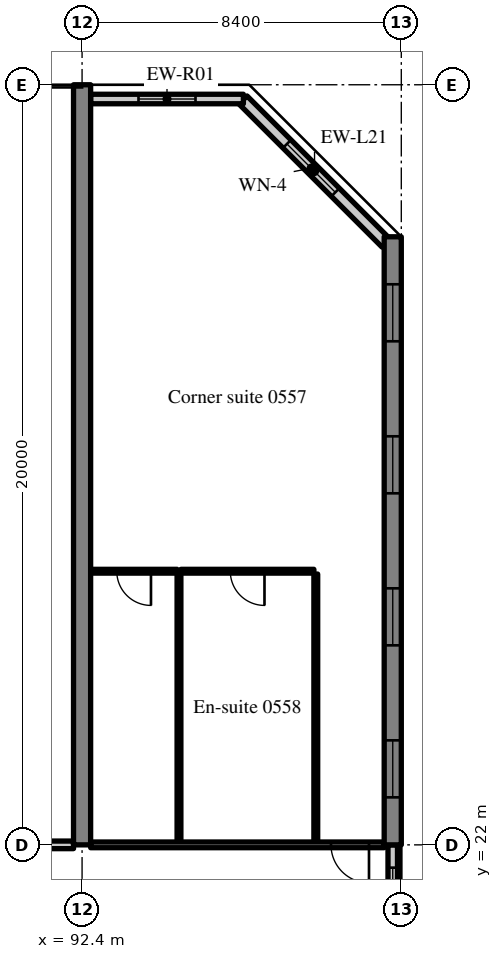
"""IFC4 building model, lengths in metres.
Left out: names, types, materials, properties, quantities, classifications, styles, units other than length and angle.
Written with IfcOpenShell. Run it as: python <this file> out.ifc"""

import sys

from ifc_helpers import new_model, si_unit, direction, frame, frame_2d, origin, place, context, subcontext, project, spatial, rectangle, extrude, source, transform, mapped, element, fill, save


model = new_model("IFC4")
c1 = context("Model", 3, precision=1e-05, world=origin(), true_north=direction((0.0, 1.0)))
c2 = subcontext(c1, "Body", "Model", "MODEL_VIEW")
j1 = project(units=[si_unit("LENGTHUNIT", "METRE"), si_unit("PLANEANGLEUNIT", "RADIAN")], contexts=[c1])
p1 = place(None, origin())
s1 = spatial("IfcSite", under=j1, at=p1, CompositionType="ELEMENT")
p2 = place(p1, origin())
s2 = spatial("IfcBuilding", under=s1, at=p2, CompositionType="ELEMENT")
p3 = place(p2, frame((0.0, 0.0, 27.8)))
s3 = spatial("IfcBuildingStorey", under=s2, at=p3, CompositionType="ELEMENT", Elevation=27.8)
m1 = source(origin(), c2, "Body", "SweptSolid", [
    extrude(rectangle(XDim=20.0, YDim=0.45, at=frame_2d((10.0, 0.0))), origin(), (0.0, 0.0, 1.0), 3.52),
])
p4 = place(p3, frame((92.4, 22.0, 0.0), z_axis=(0.0, 0.0, 1.0), x_axis=(0.0, 1.0, 0.0)))
e1 = element("IfcWall", 1, at=p4, inside=s3, PredefinedType="SHEAR", context=c2, shape_type="MappedRepresentation", body=[
    mapped(m1, transform((0.0, 0.0, 0.0), scale=1.0)),
])
m2 = source(origin(), c2, "Body", "SweptSolid", [
    extrude(rectangle(XDim=16.0, YDim=0.45, at=frame_2d((8.0, 0.0))), origin(), (0.0, 0.0, 1.0), 3.52),
])
p5 = place(p3, frame((100.575, 22.0, 0.0), z_axis=(0.0, 0.0, 1.0), x_axis=(0.0, 1.0, 0.0)))
e2 = element("IfcWall", 2, at=p5, inside=s3, PredefinedType="SHEAR", context=c2, shape_type="MappedRepresentation", body=[
    mapped(m2, transform((0.0, 0.0, 0.0), scale=1.0)),
])
m3 = source(origin(), c2, "Body", "SweptSolid", [
    extrude(rectangle(XDim=1.5, YDim=1.5, at=frame_2d((0.75, 0.75))), frame((0.0, 0.235, 0.0), z_axis=(0.0, -1.0, 0.0), x_axis=(1.0, 0.0, 0.0)), (0.0, 0.0, 1.0), 0.47),
])
p6 = place(p5, frame((1.25, 0.0, 0.9)))
e3 = element("IfcOpeningElement", 3, at=p6, cuts=e2, PredefinedType="OPENING", context=c2, shape_type="MappedRepresentation", body=[
    mapped(m3, transform((0.0, 0.0, 0.0), scale=1.0)),
])
p7 = place(p5, frame((5.25, 0.0, 0.9)))
e4 = element("IfcOpeningElement", 4, at=p7, cuts=e2, PredefinedType="OPENING", context=c2, shape_type="MappedRepresentation", body=[
    mapped(m3, transform((0.0, 0.0, 0.0), scale=1.0)),
])
p8 = place(p5, frame((9.25, 0.0, 0.9)))
e5 = element("IfcOpeningElement", 5, at=p8, cuts=e2, PredefinedType="OPENING", context=c2, shape_type="MappedRepresentation", body=[
    mapped(m3, transform((0.0, 0.0, 0.0), scale=1.0)),
])
p9 = place(p5, frame((13.25, 0.0, 0.9)))
e6 = element("IfcOpeningElement", 6, at=p9, cuts=e2, PredefinedType="OPENING", context=c2, shape_type="MappedRepresentation", body=[
    mapped(m3, transform((0.0, 0.0, 0.0), scale=1.0)),
])
m4 = source(origin(), c2, "Body", "SweptSolid", [
    extrude(rectangle(XDim=5.326, YDim=0.3, at=frame_2d((2.663, 0.0))), origin(), (0.0, 0.0, 1.0), 3.52),
])
p10 = place(p3, frame((100.4, 37.834, 0.0), z_axis=(0.0, 0.0, 1.0), x_axis=(-0.707083859269, 0.707129702361, 0.0)))
e7 = element("IfcWall", 7, at=p10, inside=s3, PredefinedType="SOLIDWALL", context=c2, shape_type="MappedRepresentation", body=[
    mapped(m4, transform((0.0, 0.0, 0.0), scale=1.0)),
])
m5 = source(origin(), c2, "Body", "SweptSolid", [
    extrude(rectangle(XDim=1.8, YDim=1.5, at=frame_2d((0.9, 0.75))), frame((0.0, 0.16, 0.0), z_axis=(0.0, -1.0, 0.0), x_axis=(1.0, 0.0, 0.0)), (0.0, 0.0, 1.0), 0.32),
])
p11 = place(p10, frame((1.889, 0.0, 0.9)))
e8 = element("IfcOpeningElement", 8, at=p11, cuts=e7, PredefinedType="OPENING", context=c2, shape_type="MappedRepresentation", body=[
    mapped(m5, transform((0.0, 0.0, 0.0), scale=1.0)),
])
m6 = source(origin(), c2, "Body", "SweptSolid", [
    extrude(rectangle(XDim=4.02, YDim=0.25, at=frame_2d((2.01, 0.0))), origin(), (0.0, 0.0, 1.0), 2.77),
])
p12 = place(p3, frame((96.645, 41.625, 0.0), z_axis=(0.0, 0.0, 1.0), x_axis=(-1.0, 0.0, 0.0)))
e9 = element("IfcWall", 9, at=p12, inside=s3, PredefinedType="SOLIDWALL", context=c2, shape_type="MappedRepresentation", body=[
    mapped(m6, transform((0.0, 0.0, 0.0), scale=1.0)),
])
m7 = source(origin(), c2, "Body", "SweptSolid", [
    extrude(rectangle(XDim=1.5, YDim=1.5, at=frame_2d((0.75, 0.75))), frame((0.0, 0.135, 0.0), z_axis=(0.0, -1.0, 0.0), x_axis=(1.0, 0.0, 0.0)), (0.0, 0.0, 1.0), 0.27),
])
p13 = place(p12, frame((1.26, 0.0, 0.9)))
e10 = element("IfcOpeningElement", 10, at=p13, cuts=e9, PredefinedType="OPENING", context=c2, shape_type="MappedRepresentation", body=[
    mapped(m7, transform((0.0, 0.0, 0.0), scale=1.0)),
])
m8 = source(origin(), c2, "Body", "SweptSolid", [
    extrude(rectangle(XDim=2.4, YDim=0.25, at=frame_2d((1.2, 0.0))), origin(), (0.0, 0.0, 1.0), 2.62),
])
p14 = place(p3, frame((100.575, 19.6, 0.0), z_axis=(0.0, 0.0, 1.0), x_axis=(0.0, 1.0, 0.0)))
e11 = element("IfcWall", 11, at=p14, inside=s3, PredefinedType="SOLIDWALL", context=c2, shape_type="MappedRepresentation", body=[
    mapped(m8, transform((0.0, 0.0, 0.0), scale=1.0)),
])
m9 = source(origin(), c2, "Body", "SweptSolid", [
    extrude(rectangle(XDim=1.2, YDim=1.5, at=frame_2d((0.6, 0.75))), frame((0.0, 0.135, 0.0), z_axis=(0.0, -1.0, 0.0), x_axis=(1.0, 0.0, 0.0)), (0.0, 0.0, 1.0), 0.27),
])
p15 = place(p14, frame((0.6, 0.0, 0.9)))
e12 = element("IfcOpeningElement", 12, at=p15, cuts=e11, PredefinedType="OPENING", context=c2, shape_type="MappedRepresentation", body=[
    mapped(m9, transform((0.0, 0.0, 0.0), scale=1.0)),
])
m10 = source(origin(), c2, "Body", "SweptSolid", [
    extrude(rectangle(XDim=7.05, YDim=0.1, at=frame_2d((3.525, 0.0))), origin(), (0.0, 0.0, 1.0), 3.52),
])
for number, where, z_axis, x_axis in (
    (13, (98.55, 22.075, 0.0), (0.0, 0.0, 1.0), (0.0, 1.0, 0.0)),
    (14, (94.95, 22.075, 0.0), (0.0, 0.0, 1.0), (0.0, 1.0, 0.0)),
):
    element("IfcWall", number, at=place(p3, frame(where, z_axis=z_axis, x_axis=x_axis)), inside=s3, PredefinedType="PARTITIONING", context=c2, shape_type="MappedRepresentation", body=[
        mapped(m10, transform((0.0, 0.0, 0.0), scale=1.0)),
    ])
m11 = source(origin(), c2, "Body", "SweptSolid", [
    extrude(rectangle(XDim=3.5, YDim=0.1, at=frame_2d((1.75, 0.0))), origin(), (0.0, 0.0, 1.0), 3.52),
])
p16 = place(p3, frame((95.0, 29.2, 0.0), z_axis=(0.0, 0.0, 1.0), x_axis=(1.0, 0.0, 0.0)))
e15 = element("IfcWall", 15, at=p16, inside=s3, PredefinedType="PARTITIONING", context=c2, shape_type="MappedRepresentation", body=[
    mapped(m11, transform((0.0, 0.0, 0.0), scale=1.0)),
])
m12 = source(origin(), c2, "Body", "SweptSolid", [
    extrude(rectangle(XDim=0.9, YDim=2.1, at=frame_2d((0.45, 1.05))), frame((0.0, 0.06, 0.0), z_axis=(0.0, -1.0, 0.0), x_axis=(1.0, 0.0, 0.0)), (0.0, 0.0, 1.0), 0.12),
])
p17 = place(p16, frame((1.3, 0.0, 0.0)))
e16 = element("IfcOpeningElement", 16, at=p17, cuts=e15, PredefinedType="OPENING", context=c2, shape_type="MappedRepresentation", body=[
    mapped(m12, transform((0.0, 0.0, 0.0), scale=1.0)),
])
m13 = source(origin(), c2, "Body", "SweptSolid", [
    extrude(rectangle(XDim=2.275, YDim=0.1, at=frame_2d((1.137, 0.0))), origin(), (0.0, 0.0, 1.0), 3.52),
])
p18 = place(p3, frame((92.625, 29.2, 0.0), z_axis=(0.0, 0.0, 1.0), x_axis=(1.0, 0.0, 0.0)))
e17 = element("IfcWall", 17, at=p18, inside=s3, PredefinedType="PARTITIONING", context=c2, shape_type="MappedRepresentation", body=[
    mapped(m13, transform((0.0, 0.0, 0.0), scale=1.0)),
])
p19 = place(p18, frame((0.688, 0.0, 0.0)))
e18 = element("IfcOpeningElement", 18, at=p19, cuts=e17, PredefinedType="OPENING", context=c2, shape_type="MappedRepresentation", body=[
    mapped(m12, transform((0.0, 0.0, 0.0), scale=1.0)),
])
m14 = source(origin(), c2, "Body", "SweptSolid", [
    extrude(rectangle(XDim=7.725, YDim=0.15, at=frame_2d((3.863, 0.0))), origin(), (0.0, 0.0, 1.0), 2.82),
])
p20 = place(p3, frame((92.625, 22.0, 0.0), z_axis=(0.0, 0.0, 1.0), x_axis=(1.0, 0.0, 0.0)))
e19 = element("IfcWall", 19, at=p20, inside=s3, PredefinedType="PARTITIONING", context=c2, shape_type="MappedRepresentation", body=[
    mapped(m14, transform((0.0, 0.0, 0.0), scale=1.0)),
])
m15 = source(origin(), c2, "Body", "SweptSolid", [
    extrude(rectangle(XDim=1.0, YDim=2.1, at=frame_2d((0.5, 1.05))), frame((0.0, 0.085, 0.0), z_axis=(0.0, -1.0, 0.0), x_axis=(1.0, 0.0, 0.0)), (0.0, 0.0, 1.0), 0.17),
])
p21 = place(p20, frame((6.325, 0.0, 0.0)))
e20 = element("IfcOpeningElement", 20, at=p21, cuts=e19, PredefinedType="OPENING", context=c2, shape_type="MappedRepresentation", body=[
    mapped(m15, transform((0.0, 0.0, 0.0), scale=1.0)),
])
m16 = source(origin(), c2, "Body", "SweptSolid", [
    extrude(rectangle(XDim=7.95, YDim=0.2, at=frame_2d((3.975, 0.0))), origin(), (0.0, 0.0, 1.0), 2.82),
])
p22 = place(p3, frame((84.225, 22.0, 0.0), z_axis=(0.0, 0.0, 1.0), x_axis=(1.0, 0.0, 0.0)))
e21 = element("IfcWall", 21, at=p22, inside=s3, PredefinedType="PARTITIONING", context=c2, shape_type="MappedRepresentation", body=[
    mapped(m16, transform((0.0, 0.0, 0.0), scale=1.0)),
])
m17 = source(origin(), c2, "Body", "SweptSolid", [
    extrude(rectangle(XDim=1.8, YDim=1.5, at=frame_2d((0.9, 0.75))), frame((0.0, 0.03, 0.0), z_axis=(0.0, -1.0, 0.0), x_axis=(1.0, 0.0, 0.0)), (0.0, 0.0, 1.0), 0.06),
])
p23 = place(p11, origin())
e22 = element("IfcWindow", 22, at=p23, inside=s3, PartitioningType="SINGLE_PANEL", PredefinedType="WINDOW", context=c2, shape_type="MappedRepresentation", body=[
    mapped(m17, transform((0.0, 0.0, 0.0), scale=1.0)),
])
fill(e8, e22)
m18 = source(origin(), c2, "Body", "SweptSolid", [
    extrude(rectangle(XDim=1.5, YDim=1.5, at=frame_2d((0.75, 0.75))), frame((0.0, 0.03, 0.0), z_axis=(0.0, -1.0, 0.0), x_axis=(1.0, 0.0, 0.0)), (0.0, 0.0, 1.0), 0.06),
])
p24 = place(p13, origin())
e23 = element("IfcWindow", 23, at=p24, inside=s3, PartitioningType="SINGLE_PANEL", PredefinedType="WINDOW", context=c2, shape_type="MappedRepresentation", body=[
    mapped(m18, transform((0.0, 0.0, 0.0), scale=1.0)),
])
fill(e10, e23)
p25 = place(p6, origin())
e24 = element("IfcWindow", 24, at=p25, inside=s3, PartitioningType="SINGLE_PANEL", PredefinedType="WINDOW", context=c2, shape_type="MappedRepresentation", body=[
    mapped(m18, transform((0.0, 0.0, 0.0), scale=1.0)),
])
fill(e3, e24)
p26 = place(p7, origin())
e25 = element("IfcWindow", 25, at=p26, inside=s3, PartitioningType="SINGLE_PANEL", PredefinedType="WINDOW", context=c2, shape_type="MappedRepresentation", body=[
    mapped(m18, transform((0.0, 0.0, 0.0), scale=1.0)),
])
fill(e4, e25)
p27 = place(p8, origin())
e26 = element("IfcWindow", 26, at=p27, inside=s3, PartitioningType="SINGLE_PANEL", PredefinedType="WINDOW", context=c2, shape_type="MappedRepresentation", body=[
    mapped(m18, transform((0.0, 0.0, 0.0), scale=1.0)),
])
fill(e5, e26)
p28 = place(p9, origin())
e27 = element("IfcWindow", 27, at=p28, inside=s3, PartitioningType="SINGLE_PANEL", PredefinedType="WINDOW", context=c2, shape_type="MappedRepresentation", body=[
    mapped(m18, transform((0.0, 0.0, 0.0), scale=1.0)),
])
fill(e6, e27)
m19 = source(origin(), c2, "Body", "SweptSolid", [
    extrude(rectangle(XDim=1.2, YDim=1.5, at=frame_2d((0.6, 0.75))), frame((0.0, 0.03, 0.0), z_axis=(0.0, -1.0, 0.0), x_axis=(1.0, 0.0, 0.0)), (0.0, 0.0, 1.0), 0.06),
])
p29 = place(p15, origin())
e28 = element("IfcWindow", 28, at=p29, inside=s3, PartitioningType="SINGLE_PANEL", PredefinedType="WINDOW", context=c2, shape_type="MappedRepresentation", body=[
    mapped(m19, transform((0.0, 0.0, 0.0), scale=1.0)),
])
fill(e12, e28)
m20 = source(origin(), c2, "Body", "SweptSolid", [
    extrude(rectangle(XDim=0.9, YDim=2.1, at=frame_2d((0.45, 1.05))), frame((0.0, 0.025, 0.0), z_axis=(0.0, -1.0, 0.0), x_axis=(1.0, 0.0, 0.0)), (0.0, 0.0, 1.0), 0.05),
])
p30 = place(p17, origin())
e29 = element("IfcDoor", 29, at=p30, inside=s3, OperationType="SINGLE_SWING_RIGHT", PredefinedType="DOOR", context=c2, shape_type="MappedRepresentation", body=[
    mapped(m20, transform((0.0, 0.0, 0.0), scale=1.0)),
])
fill(e16, e29)
p31 = place(p19, origin())
e30 = element("IfcDoor", 30, at=p31, inside=s3, OperationType="SINGLE_SWING_RIGHT", PredefinedType="DOOR", context=c2, shape_type="MappedRepresentation", body=[
    mapped(m20, transform((0.0, 0.0, 0.0), scale=1.0)),
])
fill(e18, e30)
m21 = source(origin(), c2, "Body", "SweptSolid", [
    extrude(rectangle(XDim=1.0, YDim=2.1, at=frame_2d((0.5, 1.05))), frame((0.0, 0.025, 0.0), z_axis=(0.0, -1.0, 0.0), x_axis=(1.0, 0.0, 0.0)), (0.0, 0.0, 1.0), 0.05),
])
p32 = place(p21, origin())
e31 = element("IfcDoor", 31, at=p32, inside=s3, OperationType="SINGLE_SWING_RIGHT", PredefinedType="DOOR", context=c2, shape_type="MappedRepresentation", body=[
    mapped(m21, transform((0.0, 0.0, 0.0), scale=1.0)),
])
fill(e20, e31)
save(model, sys.argv[1])
